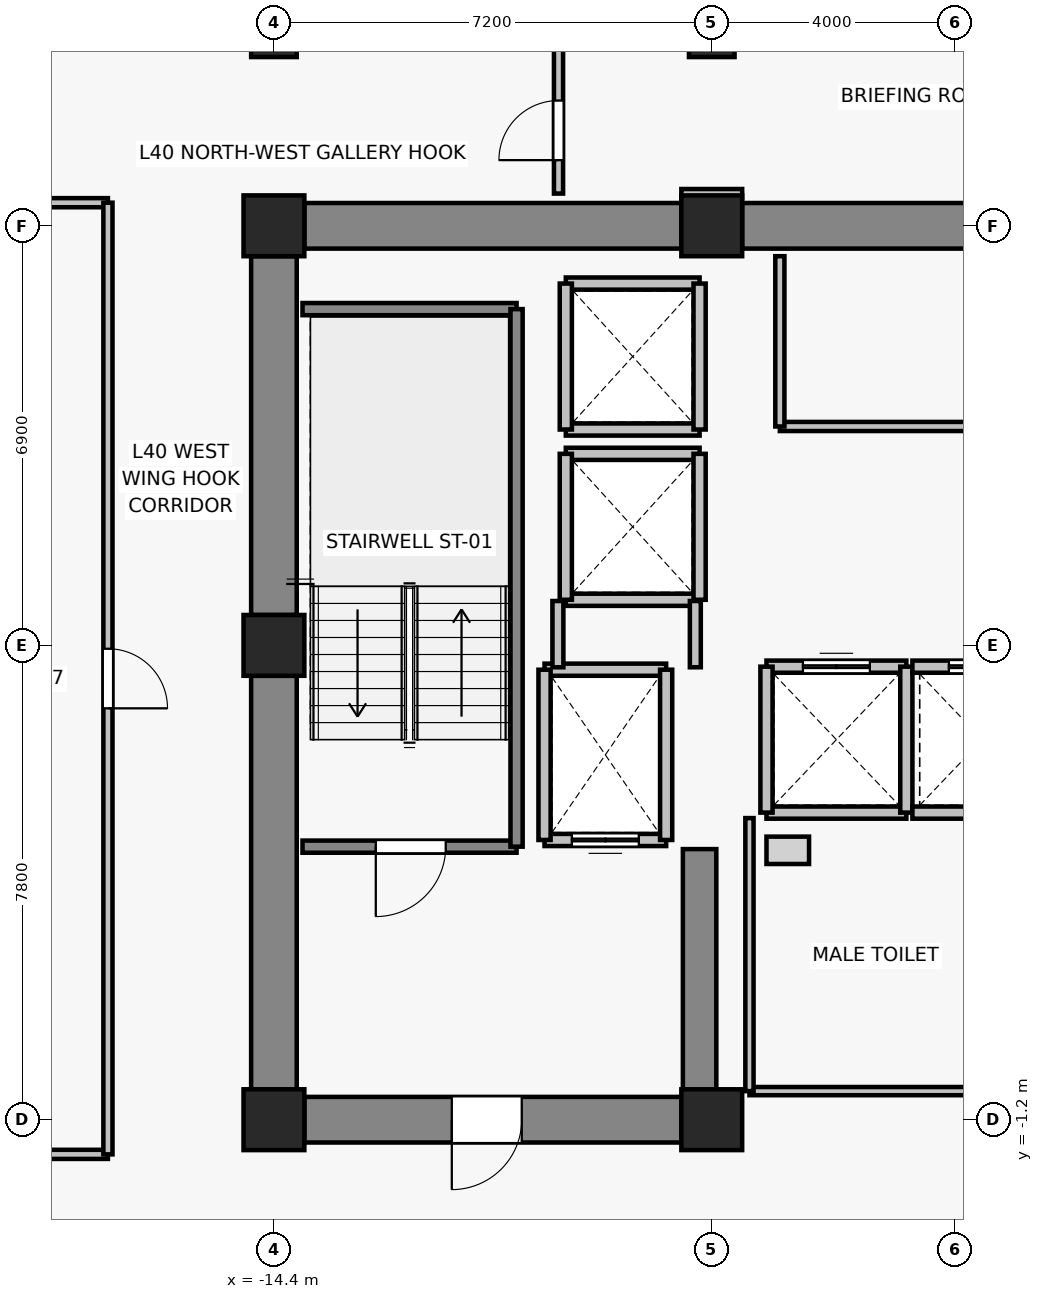
"""IFC4 building model, lengths in metres.
Left out: names, types, materials, properties, quantities, classifications, styles, units other than length and angle.
Written with IfcOpenShell. Run it as: python <this file> out.ifc"""

import sys

from ifc_helpers import new_model, si_unit, direction, frame, frame_2d, origin, origin_2d, place, context, subcontext, project, spatial, rectangle, extrude, source, transform, mapped, element, fill, save


model = new_model("IFC4")
c1 = context("Model", 3, precision=1e-05, world=origin(), true_north=direction((0.0, 1.0)))
c2 = subcontext(c1, "Body", "Model", "MODEL_VIEW")
j1 = project(units=[si_unit("LENGTHUNIT", "METRE"), si_unit("PLANEANGLEUNIT", "RADIAN")], contexts=[c1])
p1 = place(None, origin())
s1 = spatial("IfcSite", under=j1, at=p1, CompositionType="ELEMENT")
p2 = place(p1, origin())
s2 = spatial("IfcBuilding", under=s1, at=p2, CompositionType="ELEMENT")
p3 = place(p2, frame((0.0, 0.0, 146.2)))
s3 = spatial("IfcBuildingStorey", under=s2, at=p3, CompositionType="ELEMENT", Elevation=146.2)
for number, where, z_axis, x_axis in (
    (1, (-14.4, -1.2, 0.0), (0.0, 0.0, 1.0), (1.0, 0.0, 0.0)),
    (2, (-7.2, -1.2, 0.0), (0.0, 0.0, 1.0), (1.0, 0.0, 0.0)),
    (3, (-14.4, 6.6, 0.0), (0.0, 0.0, 1.0), (1.0, 0.0, 0.0)),
    (4, (-14.4, 13.5, 0.0), (0.0, 0.0, 1.0), (1.0, 0.0, 0.0)),
    (5, (-7.2, 13.5, 0.0), (0.0, 0.0, 1.0), (1.0, 0.0, 0.0)),
):
    element("IfcColumn", number, at=place(p3, frame(where, z_axis=z_axis, x_axis=x_axis)), inside=s3, PredefinedType="COLUMN", context=c2, shape_type="SweptSolid", body=[
        extrude(rectangle(XDim=1.0, YDim=1.0, at=origin_2d()), origin(), (0.0, 0.0, 1.0), 3.3),
    ])
for number, where, z_axis, x_axis in (
    (6, (-14.4, 16.65, 0.0), (0.0, 0.0, 1.0), (1.0, 0.0, 0.0)),
    (7, (-7.2, 16.65, 0.0), (0.0, 0.0, 1.0), (1.0, 0.0, 0.0)),
):
    element("IfcColumn", number, at=place(p3, frame(where, z_axis=z_axis, x_axis=x_axis)), inside=s3, PredefinedType="COLUMN", context=c2, shape_type="SweptSolid", body=[
        extrude(rectangle(XDim=0.75, YDim=0.75, at=origin_2d()), origin(), (0.0, 0.0, 1.0), 3.3),
    ])
p4 = place(p3, frame((-13.9, 13.5, 0.0), z_axis=(0.0, 0.0, 1.0), x_axis=(1.0, 0.0, 0.0)))
e8 = element("IfcWall", 8, at=p4, inside=s3, PredefinedType="SHEAR", context=c2, shape_type="SweptSolid", body=[
    extrude(rectangle(XDim=6.2, YDim=0.75, at=frame_2d((3.1, 0.0))), origin(), (0.0, 0.0, 1.0), 3.075),
])
p5 = place(p3, frame((-6.7, 13.5, 0.0), z_axis=(0.0, 0.0, 1.0), x_axis=(1.0, 0.0, 0.0)))
e9 = element("IfcWall", 9, at=p5, inside=s3, PredefinedType="SHEAR", context=c2, shape_type="SweptSolid", body=[
    extrude(rectangle(XDim=13.4, YDim=0.75, at=frame_2d((6.7, 0.0))), origin(), (0.0, 0.0, 1.0), 3.075),
])
p6 = place(p3, frame((-14.4, -0.7, 0.0), z_axis=(0.0, 0.0, 1.0), x_axis=(0.0, 1.0, 0.0)))
e10 = element("IfcWall", 10, at=p6, inside=s3, PredefinedType="SHEAR", context=c2, shape_type="SweptSolid", body=[
    extrude(rectangle(XDim=6.8, YDim=0.75, at=frame_2d((3.4, 0.0))), origin(), (0.0, 0.0, 1.0), 3.075),
])
p7 = place(p3, frame((-14.4, 7.1, 0.0), z_axis=(0.0, 0.0, 1.0), x_axis=(0.0, 1.0, 0.0)))
e11 = element("IfcWall", 11, at=p7, inside=s3, PredefinedType="SHEAR", context=c2, shape_type="SweptSolid", body=[
    extrude(rectangle(XDim=5.9, YDim=0.75, at=frame_2d((2.95, 0.0))), origin(), (0.0, 0.0, 1.0), 3.075),
])
p8 = place(p3, frame((-7.7, -1.2, 0.0), z_axis=(0.0, 0.0, 1.0), x_axis=(-1.0, 0.0, 0.0)))
e12 = element("IfcWall", 12, at=p8, inside=s3, PredefinedType="SHEAR", context=c2, shape_type="SweptSolid", body=[
    extrude(rectangle(XDim=6.2, YDim=0.75, at=frame_2d((3.1, 0.0))), origin(), (0.0, 0.0, 1.0), 3.075),
])
p9 = place(p8, frame((2.625, 0.0, 0.0)))
e13 = element("IfcOpeningElement", 13, at=p9, cuts=e12, PredefinedType="OPENING", context=c2, shape_type="SweptSolid", body=[
    extrude(rectangle(XDim=1.15, YDim=2.15, at=frame_2d((0.575, 1.075))), frame((0.0, 0.385, 0.0), z_axis=(0.0, -1.0, 0.0), x_axis=(1.0, 0.0, 0.0)), (0.0, 0.0, 1.0), 0.77),
])
p10 = place(p3, frame((-7.4, -0.825, 0.0), z_axis=(0.0, 0.0, 1.0), x_axis=(0.0, 1.0, 0.0)))
e14 = element("IfcWall", 14, at=p10, inside=s3, PredefinedType="SHEAR", context=c2, shape_type="SweptSolid", body=[
    extrude(rectangle(XDim=4.075, YDim=0.55, at=frame_2d((2.038, 0.0))), origin(), (0.0, 0.0, 1.0), 3.075),
])
p11 = place(p3, frame((-7.95, 3.4, 0.0), z_axis=(0.0, 0.0, 1.0), x_axis=(-1.0, 0.0, 0.0)))
e15 = element("IfcWall", 15, at=p11, inside=s3, PredefinedType="SOLIDWALL", context=c2, shape_type="SweptSolid", body=[
    extrude(rectangle(XDim=2.0, YDim=0.2, at=frame_2d((1.0, 0.0))), origin(), (0.0, 0.0, 1.0), 3.075),
])
p12 = place(p11, frame((0.45, 0.0, 0.0)))
e16 = element("IfcOpeningElement", 16, at=p12, cuts=e15, PredefinedType="OPENING", context=c2, shape_type="SweptSolid", body=[
    extrude(rectangle(XDim=1.1, YDim=2.2, at=frame_2d((0.55, 1.1))), frame((0.0, 0.11, 0.0), z_axis=(0.0, -1.0, 0.0), x_axis=(1.0, 0.0, 0.0)), (0.0, 0.0, 1.0), 0.22),
])
p13 = place(p3, frame((-9.95, 6.2, 0.0), z_axis=(0.0, 0.0, 1.0), x_axis=(1.0, 0.0, 0.0)))
e17 = element("IfcWall", 17, at=p13, inside=s3, PredefinedType="SOLIDWALL", context=c2, shape_type="SweptSolid", body=[
    extrude(rectangle(XDim=2.0, YDim=0.2, at=frame_2d((1.0, 0.0))), origin(), (0.0, 0.0, 1.0), 3.075),
])
for number, where, z_axis, x_axis in (
    (18, (-9.95, 3.4, 0.0), (0.0, 0.0, 1.0), (0.0, 1.0, 0.0)),
    (19, (-7.95, 6.2, 0.0), (0.0, 0.0, 1.0), (0.0, -1.0, 0.0)),
):
    element("IfcWall", number, at=place(p3, frame(where, z_axis=z_axis, x_axis=x_axis)), inside=s3, PredefinedType="SOLIDWALL", context=c2, shape_type="SweptSolid", body=[
        extrude(rectangle(XDim=2.8, YDim=0.2, at=frame_2d((1.4, 0.0))), origin(), (0.0, 0.0, 1.0), 3.075),
    ])
p14 = place(p3, frame((-4.0, 3.85, 0.0), z_axis=(0.0, 0.0, 1.0), x_axis=(-1.0, 0.0, 0.0)))
e20 = element("IfcWall", 20, at=p14, inside=s3, PredefinedType="SOLIDWALL", context=c2, shape_type="SweptSolid", body=[
    extrude(rectangle(XDim=2.3, YDim=0.2, at=frame_2d((1.15, 0.0))), origin(), (0.0, 0.0, 1.0), 3.075),
])
p15 = place(p3, frame((-6.3, 6.25, 0.0), z_axis=(0.0, 0.0, 1.0), x_axis=(1.0, 0.0, 0.0)))
e21 = element("IfcWall", 21, at=p15, inside=s3, PredefinedType="SOLIDWALL", context=c2, shape_type="SweptSolid", body=[
    extrude(rectangle(XDim=2.3, YDim=0.2, at=frame_2d((1.15, 0.0))), origin(), (0.0, 0.0, 1.0), 3.075),
])
p16 = place(p15, frame((0.6, 0.0, 0.0)))
e22 = element("IfcOpeningElement", 22, at=p16, cuts=e21, PredefinedType="OPENING", context=c2, shape_type="SweptSolid", body=[
    extrude(rectangle(XDim=1.1, YDim=2.2, at=frame_2d((0.55, 1.1))), frame((0.0, 0.11, 0.0), z_axis=(0.0, -1.0, 0.0), x_axis=(1.0, 0.0, 0.0)), (0.0, 0.0, 1.0), 0.22),
])
for number, where, z_axis, x_axis in (
    (23, (-6.3, 3.85, 0.0), (0.0, 0.0, 1.0), (0.0, 1.0, 0.0)),
    (24, (-4.0, 6.25, 0.0), (0.0, 0.0, 1.0), (0.0, -1.0, 0.0)),
):
    element("IfcWall", number, at=place(p3, frame(where, z_axis=z_axis, x_axis=x_axis)), inside=s3, PredefinedType="SOLIDWALL", context=c2, shape_type="SweptSolid", body=[
        extrude(rectangle(XDim=2.4, YDim=0.2, at=frame_2d((1.2, 0.0))), origin(), (0.0, 0.0, 1.0), 3.075),
    ])
p17 = place(p3, frame((-1.6, 3.85, 0.0), z_axis=(0.0, 0.0, 1.0), x_axis=(-1.0, 0.0, 0.0)))
e25 = element("IfcWall", 25, at=p17, inside=s3, PredefinedType="SOLIDWALL", context=c2, shape_type="SweptSolid", body=[
    extrude(rectangle(XDim=2.3, YDim=0.2, at=frame_2d((1.15, 0.0))), origin(), (0.0, 0.0, 1.0), 3.075),
])
p18 = place(p3, frame((-3.9, 6.25, 0.0), z_axis=(0.0, 0.0, 1.0), x_axis=(1.0, 0.0, 0.0)))
e26 = element("IfcWall", 26, at=p18, inside=s3, PredefinedType="SOLIDWALL", context=c2, shape_type="SweptSolid", body=[
    extrude(rectangle(XDim=2.3, YDim=0.2, at=frame_2d((1.15, 0.0))), origin(), (0.0, 0.0, 1.0), 3.075),
])
p19 = place(p18, frame((0.6, 0.0, 0.0)))
e27 = element("IfcOpeningElement", 27, at=p19, cuts=e26, PredefinedType="OPENING", context=c2, shape_type="SweptSolid", body=[
    extrude(rectangle(XDim=1.1, YDim=2.2, at=frame_2d((0.55, 1.1))), frame((0.0, 0.11, 0.0), z_axis=(0.0, -1.0, 0.0), x_axis=(1.0, 0.0, 0.0)), (0.0, 0.0, 1.0), 0.22),
])
for number, where, z_axis, x_axis in (
    (28, (-7.4, 7.35, 0.0), (0.0, 0.0, 1.0), (-1.0, 0.0, 0.0)),
    (29, (-9.6, 9.75, 0.0), (0.0, 0.0, 1.0), (1.0, 0.0, 0.0)),
):
    element("IfcWall", number, at=place(p3, frame(where, z_axis=z_axis, x_axis=x_axis)), inside=s3, PredefinedType="SOLIDWALL", context=c2, shape_type="SweptSolid", body=[
        extrude(rectangle(XDim=2.2, YDim=0.2, at=frame_2d((1.1, 0.0))), origin(), (0.0, 0.0, 1.0), 2.565),
    ])
p20 = place(p3, frame((-9.6, 7.35, 0.0), z_axis=(0.0, 0.0, 1.0), x_axis=(0.0, 1.0, 0.0)))
e30 = element("IfcWall", 30, at=p20, inside=s3, PredefinedType="SOLIDWALL", context=c2, shape_type="SweptSolid", body=[
    extrude(rectangle(XDim=2.4, YDim=0.2, at=frame_2d((1.2, 0.0))), origin(), (0.0, 0.0, 1.0), 3.075),
])
p21 = place(p3, frame((-7.4, 9.75, 0.0), z_axis=(0.0, 0.0, 1.0), x_axis=(0.0, -1.0, 0.0)))
e31 = element("IfcWall", 31, at=p21, inside=s3, PredefinedType="SOLIDWALL", context=c2, shape_type="SweptSolid", body=[
    extrude(rectangle(XDim=2.4, YDim=0.2, at=frame_2d((1.2, 0.0))), origin(), (0.0, 0.0, 1.0), 2.565),
])
for number, where, z_axis, x_axis in (
    (32, (-7.4, 10.15, 0.0), (0.0, 0.0, 1.0), (-1.0, 0.0, 0.0)),
    (33, (-9.6, 12.55, 0.0), (0.0, 0.0, 1.0), (1.0, 0.0, 0.0)),
):
    element("IfcWall", number, at=place(p3, frame(where, z_axis=z_axis, x_axis=x_axis)), inside=s3, PredefinedType="SOLIDWALL", context=c2, shape_type="SweptSolid", body=[
        extrude(rectangle(XDim=2.2, YDim=0.2, at=frame_2d((1.1, 0.0))), origin(), (0.0, 0.0, 1.0), 2.565),
    ])
p22 = place(p3, frame((-9.6, 10.15, 0.0), z_axis=(0.0, 0.0, 1.0), x_axis=(0.0, 1.0, 0.0)))
e34 = element("IfcWall", 34, at=p22, inside=s3, PredefinedType="SOLIDWALL", context=c2, shape_type="SweptSolid", body=[
    extrude(rectangle(XDim=2.4, YDim=0.2, at=frame_2d((1.2, 0.0))), origin(), (0.0, 0.0, 1.0), 3.075),
])
p23 = place(p3, frame((-7.4, 12.55, 0.0), z_axis=(0.0, 0.0, 1.0), x_axis=(0.0, -1.0, 0.0)))
e35 = element("IfcWall", 35, at=p23, inside=s3, PredefinedType="SOLIDWALL", context=c2, shape_type="SweptSolid", body=[
    extrude(rectangle(XDim=2.4, YDim=0.2, at=frame_2d((1.2, 0.0))), origin(), (0.0, 0.0, 1.0), 2.565),
])
p24 = place(p3, frame((-10.41, 3.29, 0.0), z_axis=(0.0, 0.0, 1.0), x_axis=(-1.0, 0.0, 0.0)))
e36 = element("IfcWall", 36, at=p24, inside=s3, PredefinedType="SOLIDWALL", context=c2, shape_type="SweptSolid", body=[
    extrude(rectangle(XDim=3.52, YDim=0.2, at=frame_2d((1.76, 0.0))), origin(), (0.0, 0.0, 1.0), 3.075),
])
p25 = place(p24, frame((1.165, 0.0, 0.0)))
e37 = element("IfcOpeningElement", 37, at=p25, cuts=e36, PredefinedType="OPENING", context=c2, shape_type="SweptSolid", body=[
    extrude(rectangle(XDim=1.15, YDim=2.15, at=frame_2d((0.575, 1.075))), frame((0.0, 0.11, 0.0), z_axis=(0.0, -1.0, 0.0), x_axis=(1.0, 0.0, 0.0)), (0.0, 0.0, 1.0), 0.22),
])
p26 = place(p3, frame((-13.93, 12.13, 0.0), z_axis=(0.0, 0.0, 1.0), x_axis=(1.0, 0.0, 0.0)))
e38 = element("IfcWall", 38, at=p26, inside=s3, PredefinedType="SOLIDWALL", context=c2, shape_type="SweptSolid", body=[
    extrude(rectangle(XDim=3.52, YDim=0.2, at=frame_2d((1.76, 0.0))), origin(), (0.0, 0.0, 1.0), 3.075),
])
p27 = place(p3, frame((-10.41, 12.13, 0.0), z_axis=(0.0, 0.0, 1.0), x_axis=(0.0, -1.0, 0.0)))
e39 = element("IfcWall", 39, at=p27, inside=s3, PredefinedType="SOLIDWALL", context=c2, shape_type="SweptSolid", body=[
    extrude(rectangle(XDim=8.84, YDim=0.2, at=frame_2d((4.42, 0.0))), origin(), (0.0, 0.0, 1.0), 3.075),
])
p28 = place(p3, frame((-9.73, 6.24, 0.0), z_axis=(0.0, 0.0, 1.0), x_axis=(0.0, 1.0, 0.0)))
e40 = element("IfcWall", 40, at=p28, inside=s3, PredefinedType="PARTITIONING", context=c2, shape_type="SweptSolid", body=[
    extrude(rectangle(XDim=1.09, YDim=0.18, at=frame_2d((0.545, 0.0))), origin(), (0.0, 0.0, 1.0), 3.075),
])
p29 = place(p3, frame((-7.47, 7.33, 0.0), z_axis=(0.0, 0.0, 1.0), x_axis=(0.0, -1.0, 0.0)))
e41 = element("IfcWall", 41, at=p29, inside=s3, PredefinedType="PARTITIONING", context=c2, shape_type="SweptSolid", body=[
    extrude(rectangle(XDim=1.09, YDim=0.18, at=frame_2d((0.545, 0.0))), origin(), (0.0, 0.0, 1.0), 2.565),
])
p30 = place(p3, frame((6.08, 10.2, 0.0), z_axis=(0.0, 0.0, 1.0), x_axis=(-1.0, 0.0, 0.0)))
e42 = element("IfcWall", 42, at=p30, inside=s3, PredefinedType="PARTITIONING", context=c2, shape_type="SweptSolid", body=[
    extrude(rectangle(XDim=12.16, YDim=0.15, at=frame_2d((6.08, 0.0))), origin(), (0.0, 0.0, 1.0), 3.075),
])
p31 = place(p30, frame((7.005, 0.0, 0.0)))
e43 = element("IfcOpeningElement", 43, at=p31, cuts=e42, PredefinedType="OPENING", context=c2, shape_type="SweptSolid", body=[
    extrude(rectangle(XDim=1.15, YDim=2.15, at=frame_2d((0.575, 1.075))), frame((0.0, 0.085, 0.0), z_axis=(0.0, -1.0, 0.0), x_axis=(1.0, 0.0, 0.0)), (0.0, 0.0, 1.0), 0.17),
])
p32 = place(p3, frame((-6.08, 10.2, 0.0), z_axis=(0.0, 0.0, 1.0), x_axis=(0.0, 1.0, 0.0)))
e44 = element("IfcWall", 44, at=p32, inside=s3, PredefinedType="PARTITIONING", context=c2, shape_type="SweptSolid", body=[
    extrude(rectangle(XDim=2.8, YDim=0.15, at=frame_2d((1.4, 0.0))), origin(), (0.0, 0.0, 1.0), 3.075),
])
p33 = place(p3, frame((-1.47, -0.73, 0.0), z_axis=(0.0, 0.0, 1.0), x_axis=(-1.0, 0.0, 0.0)))
e45 = element("IfcWall", 45, at=p33, inside=s3, PredefinedType="PARTITIONING", context=c2, shape_type="SweptSolid", body=[
    extrude(rectangle(XDim=5.11, YDim=0.135, at=frame_2d((2.555, 0.0))), origin(), (0.0, 0.0, 1.0), 3.075),
])
p34 = place(p3, frame((-6.58, -0.73, 0.0), z_axis=(0.0, 0.0, 1.0), x_axis=(0.0, 1.0, 0.0)))
e46 = element("IfcWall", 46, at=p34, inside=s3, PredefinedType="PARTITIONING", context=c2, shape_type="SweptSolid", body=[
    extrude(rectangle(XDim=4.49, YDim=0.135, at=frame_2d((2.245, 0.0))), origin(), (0.0, 0.0, 1.0), 3.075),
])
p35 = place(p3, frame((-17.13, -1.77, 0.0), z_axis=(0.0, 0.0, 1.0), x_axis=(-1.0, 0.0, 0.0)))
e47 = element("IfcWall", 47, at=p35, inside=s3, PredefinedType="PARTITIONING", context=c2, shape_type="SweptSolid", body=[
    extrude(rectangle(XDim=9.4, YDim=0.15, at=frame_2d((4.7, 0.0))), origin(), (0.0, 0.0, 1.0), 2.565),
])
p36 = place(p3, frame((-26.53, 13.88, 0.0), z_axis=(0.0, 0.0, 1.0), x_axis=(1.0, 0.0, 0.0)))
e48 = element("IfcWall", 48, at=p36, inside=s3, PredefinedType="PARTITIONING", context=c2, shape_type="SweptSolid", body=[
    extrude(rectangle(XDim=9.4, YDim=0.15, at=frame_2d((4.7, 0.0))), origin(), (0.0, 0.0, 1.0), 3.075),
])
p37 = place(p3, frame((-17.13, 13.88, 0.0), z_axis=(0.0, 0.0, 1.0), x_axis=(0.0, -1.0, 0.0)))
e49 = element("IfcWall", 49, at=p37, inside=s3, PredefinedType="PARTITIONING", context=c2, shape_type="SweptSolid", body=[
    extrude(rectangle(XDim=15.65, YDim=0.15, at=frame_2d((7.825, 0.0))), origin(), (0.0, 0.0, 1.0), 2.565),
])
p38 = place(p37, frame((7.335, 0.0, 0.0)))
e50 = element("IfcOpeningElement", 50, at=p38, cuts=e49, PredefinedType="OPENING", context=c2, shape_type="SweptSolid", body=[
    extrude(rectangle(XDim=0.98, YDim=2.15, at=frame_2d((0.49, 1.075))), frame((0.0, 0.085, 0.0), z_axis=(0.0, -1.0, 0.0), x_axis=(1.0, 0.0, 0.0)), (0.0, 0.0, 1.0), 0.17),
])
p39 = place(p3, frame((-6.7, 14.03, 0.0), z_axis=(0.0, 0.0, 1.0), x_axis=(-1.0, 0.0, 0.0)))
e51 = element("IfcWall", 51, at=p39, inside=s3, PredefinedType="PARTITIONING", context=c2, shape_type="SweptSolid", body=[
    extrude(rectangle(XDim=1.0, YDim=0.15, at=frame_2d((0.5, 0.0))), origin(), (0.0, 0.0, 1.0), 2.565),
])
p40 = place(p3, frame((-9.72, 14.03, 0.0), z_axis=(0.0, 0.0, 1.0), x_axis=(0.0, 1.0, 0.0)))
e52 = element("IfcWall", 52, at=p40, inside=s3, PredefinedType="PARTITIONING", context=c2, shape_type="SweptSolid", body=[
    extrude(rectangle(XDim=3.3, YDim=0.15, at=frame_2d((1.65, 0.0))), origin(), (0.0, 0.0, 1.0), 2.565),
])
p41 = place(p40, frame((0.55, 0.0, 0.0)))
e53 = element("IfcOpeningElement", 53, at=p41, cuts=e52, PredefinedType="OPENING", context=c2, shape_type="SweptSolid", body=[
    extrude(rectangle(XDim=0.98, YDim=2.15, at=frame_2d((0.49, 1.075))), frame((0.0, 0.085, 0.0), z_axis=(0.0, -1.0, 0.0), x_axis=(1.0, 0.0, 0.0)), (0.0, 0.0, 1.0), 0.17),
])
m1 = source(origin(), c2, "Body", "SweptSolid", [
    extrude(rectangle(XDim=1.1, YDim=2.2, at=frame_2d((0.55, 1.1))), frame((0.0, 0.025, 0.0), z_axis=(0.0, -1.0, 0.0), x_axis=(1.0, 0.0, 0.0)), (0.0, 0.0, 1.0), 0.05),
])
p42 = place(p12, origin())
e54 = element("IfcDoor", 54, at=p42, inside=s3, OperationType="DOUBLE_DOOR_SLIDING", PredefinedType="DOOR", context=c2, shape_type="MappedRepresentation", body=[
    mapped(m1, transform((0.0, 0.0, 0.0), x_axis=(1.0, 0.0, 0.0), y_axis=(0.0, 1.0, 0.0), z_axis=(0.0, 0.0, 1.0), scale=1.0)),
])
fill(e16, e54)
p43 = place(p16, origin())
e55 = element("IfcDoor", 55, at=p43, inside=s3, OperationType="DOUBLE_DOOR_SLIDING", PredefinedType="DOOR", context=c2, shape_type="MappedRepresentation", body=[
    mapped(m1, transform((0.0, 0.0, 0.0), x_axis=(1.0, 0.0, 0.0), y_axis=(0.0, 1.0, 0.0), z_axis=(0.0, 0.0, 1.0), scale=1.0)),
])
fill(e22, e55)
p44 = place(p19, origin())
e56 = element("IfcDoor", 56, at=p44, inside=s3, OperationType="DOUBLE_DOOR_SLIDING", PredefinedType="DOOR", context=c2, shape_type="MappedRepresentation", body=[
    mapped(m1, transform((0.0, 0.0, 0.0), x_axis=(1.0, 0.0, 0.0), y_axis=(0.0, 1.0, 0.0), z_axis=(0.0, 0.0, 1.0), scale=1.0)),
])
fill(e27, e56)
m2 = source(origin(), c2, "Body", "SweptSolid", [
    extrude(rectangle(XDim=1.15, YDim=2.15, at=frame_2d((0.575, 1.075))), frame((0.0, 0.025, 0.0), z_axis=(0.0, -1.0, 0.0), x_axis=(1.0, 0.0, 0.0)), (0.0, 0.0, 1.0), 0.05),
])
p45 = place(p25, origin())
e57 = element("IfcDoor", 57, at=p45, inside=s3, OperationType="SINGLE_SWING_RIGHT", PredefinedType="DOOR", context=c2, shape_type="MappedRepresentation", body=[
    mapped(m2, transform((0.0, 0.0, 0.0), x_axis=(1.0, 0.0, 0.0), y_axis=(0.0, 1.0, 0.0), z_axis=(0.0, 0.0, 1.0), scale=1.0)),
])
fill(e37, e57)
p46 = place(p9, origin())
e58 = element("IfcDoor", 58, at=p46, inside=s3, OperationType="SINGLE_SWING_RIGHT", PredefinedType="DOOR", context=c2, shape_type="MappedRepresentation", body=[
    mapped(m2, transform((0.0, 0.0, 0.0), x_axis=(1.0, 0.0, 0.0), y_axis=(0.0, 1.0, 0.0), z_axis=(0.0, 0.0, 1.0), scale=1.0)),
])
fill(e13, e58)
m3 = source(origin(), c2, "Body", "SweptSolid", [
    extrude(rectangle(XDim=0.98, YDim=2.15, at=frame_2d((0.49, 1.075))), frame((0.0, 0.025, 0.0), z_axis=(0.0, -1.0, 0.0), x_axis=(1.0, 0.0, 0.0)), (0.0, 0.0, 1.0), 0.05),
])
p47 = place(p38, origin())
e59 = element("IfcDoor", 59, at=p47, inside=s3, OperationType="SINGLE_SWING_RIGHT", PredefinedType="DOOR", context=c2, shape_type="MappedRepresentation", body=[
    mapped(m3, transform((0.0, 0.0, 0.0), x_axis=(1.0, 0.0, 0.0), y_axis=(0.0, 1.0, 0.0), z_axis=(0.0, 0.0, 1.0), scale=1.0)),
])
fill(e50, e59)
p48 = place(p41, origin())
e60 = element("IfcDoor", 60, at=p48, inside=s3, OperationType="SINGLE_SWING_LEFT", PredefinedType="DOOR", context=c2, shape_type="MappedRepresentation", body=[
    mapped(m3, transform((0.0, 0.0, 0.0), x_axis=(1.0, 0.0, 0.0), y_axis=(0.0, 1.0, 0.0), z_axis=(0.0, 0.0, 1.0), scale=1.0)),
])
fill(e53, e60)
save(model, sys.argv[1])
